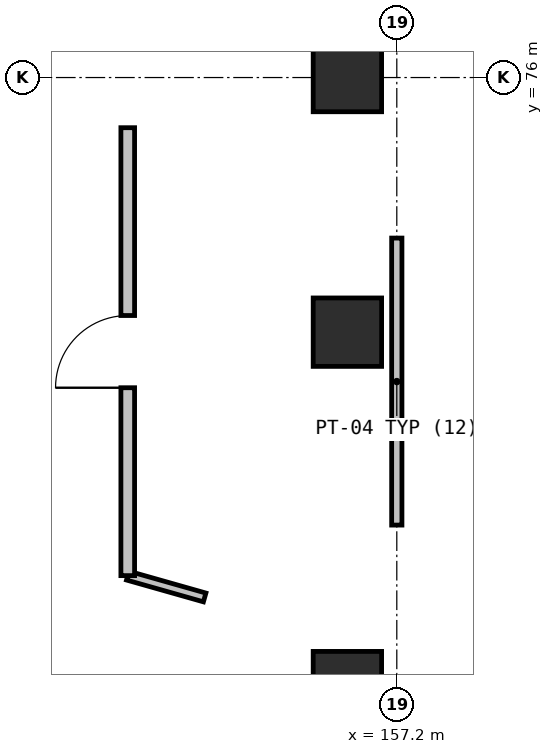
"""IFC4 building model, lengths in metres.
Left out: names, types, materials, properties, quantities, classifications, styles, units other than length and angle.
Written with IfcOpenShell. Run it as: python <this file> out.ifc"""

import sys

from ifc_helpers import new_model, si_unit, direction, frame, frame_2d, origin, origin_2d, place, context, subcontext, project, spatial, rectangle, extrude, element, fill, save


model = new_model("IFC4")
c1 = context("Model", 3, precision=1e-05, world=origin(), true_north=direction((0.0, 1.0)))
c2 = subcontext(c1, "Body", "Model", "MODEL_VIEW")
j1 = project(units=[si_unit("LENGTHUNIT", "METRE"), si_unit("PLANEANGLEUNIT", "RADIAN")], contexts=[c1])
p1 = place(None, origin())
s1 = spatial("IfcSite", under=j1, at=p1, CompositionType="ELEMENT")
p2 = place(p1, origin())
s2 = spatial("IfcBuilding", under=s1, at=p2, CompositionType="ELEMENT")
p3 = place(p2, frame((0.0, 0.0, 5.4)))
s3 = spatial("IfcBuildingStorey", under=s2, at=p3, CompositionType="ELEMENT", Elevation=5.4)
for number, where, z_axis, x_axis in (
    (1, (156.55, 68.0, 0.0), (0.0, 0.0, 1.0), (1.0, 0.0, 0.0)),
    (2, (156.55, 72.65, 0.0), (0.0, 0.0, 1.0), (1.0, 0.0, 0.0)),
    (3, (156.55, 76.0, 0.0), (0.0, 0.0, 1.0), (1.0, 0.0, 0.0)),
):
    element("IfcColumn", number, at=place(p3, frame(where, z_axis=z_axis, x_axis=x_axis)), inside=s3, PredefinedType="COLUMN", context=c2, shape_type="SweptSolid", body=[
        extrude(rectangle(XDim=0.9, YDim=0.9, at=origin_2d()), origin(), (0.0, 0.0, 1.0), 4.8),
    ])
p4 = place(p3, frame((157.2, 73.888, 0.0), z_axis=(0.0, 0.0, 1.0), x_axis=(0.0, -1.0, 0.0)))
e4 = element("IfcWall", 4, at=p4, inside=s3, PredefinedType="PARTITIONING", context=c2, shape_type="SweptSolid", body=[
    extrude(rectangle(XDim=3.776, YDim=0.135, at=frame_2d((1.888, 0.0))), origin(), (0.0, 0.0, 1.0), 4.445),
])
p5 = place(p3, frame((154.672, 69.16, 0.0), z_axis=(0.0, 0.0, 1.0), x_axis=(-0.962047568244, 0.272881799386, 0.0)))
e5 = element("IfcWall", 5, at=p5, inside=s3, PredefinedType="PARTITIONING", context=c2, shape_type="SweptSolid", body=[
    extrude(rectangle(XDim=1.052, YDim=0.12, at=frame_2d((0.526, 0.0))), origin(), (0.0, 0.0, 1.0), 4.445),
])
p6 = place(p3, frame((153.66, 69.447, 0.0), z_axis=(0.0, 0.0, 1.0), x_axis=(0.0, 1.0, 0.0)))
e6 = element("IfcWall", 6, at=p6, inside=s3, PredefinedType="PARTITIONING", context=c2, shape_type="SweptSolid", body=[
    extrude(rectangle(XDim=5.893, YDim=0.18, at=frame_2d((2.947, 0.0))), origin(), (0.0, 0.0, 1.0), 4.445),
])
p7 = place(p6, frame((2.472, 0.0, 0.0)))
e7 = element("IfcOpeningElement", 7, at=p7, cuts=e6, PredefinedType="OPENING", context=c2, shape_type="SweptSolid", body=[
    extrude(rectangle(XDim=0.95, YDim=2.1, at=frame_2d((0.475, 1.05))), frame((0.0, 0.1, 0.0), z_axis=(0.0, -1.0, 0.0), x_axis=(1.0, 0.0, 0.0)), (0.0, 0.0, 1.0), 0.2),
])
p8 = place(p7, origin())
e8 = element("IfcDoor", 8, at=p8, inside=s3, OperationType="SINGLE_SWING_RIGHT", PredefinedType="DOOR", context=c2, shape_type="SweptSolid", body=[
    extrude(rectangle(XDim=0.95, YDim=2.1, at=frame_2d((0.475, 1.05))), frame((0.0, 0.025, 0.0), z_axis=(0.0, -1.0, 0.0), x_axis=(1.0, 0.0, 0.0)), (0.0, 0.0, 1.0), 0.05),
])
fill(e7, e8)
save(model, sys.argv[1])
